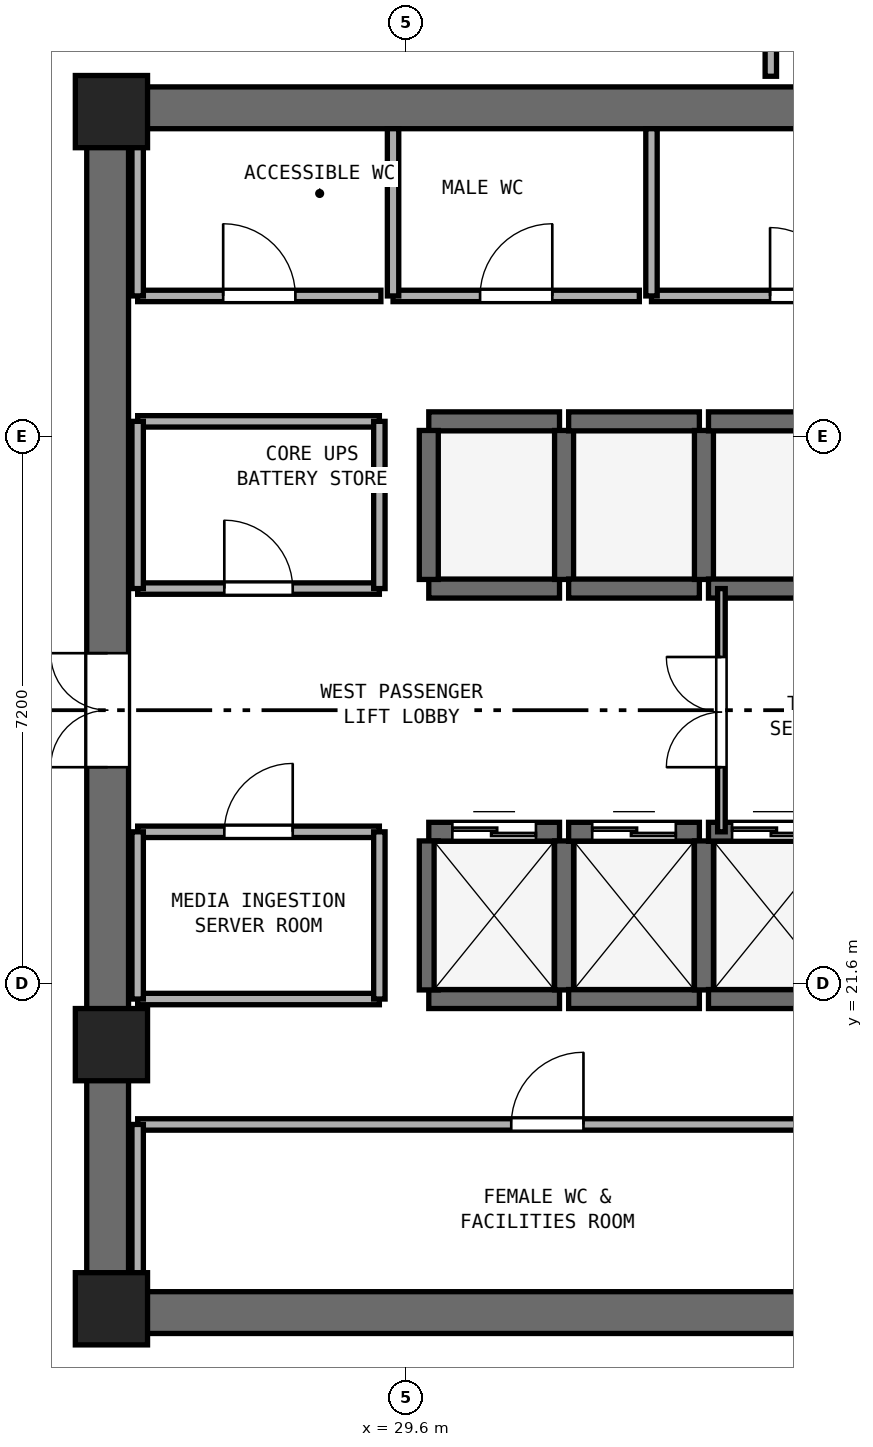
"""IFC4 building model, lengths in metres.
Left out: names, types, materials, properties, quantities, classifications, styles, units other than length and angle.
Written with IfcOpenShell. Run it as: python <this file> out.ifc"""

import sys

from ifc_helpers import new_model, si_unit, direction, frame, frame_2d, origin, origin_2d, place, context, subcontext, project, spatial, rectangle, extrude, element, fill, save


model = new_model("IFC4")
c1 = context("Model", 3, precision=1e-05, world=origin(), true_north=direction((0.0, 1.0)))
c2 = subcontext(c1, "Body", "Model", "MODEL_VIEW")
j1 = project(units=[si_unit("LENGTHUNIT", "METRE"), si_unit("PLANEANGLEUNIT", "RADIAN")], contexts=[c1])
p1 = place(None, origin())
s1 = spatial("IfcSite", under=j1, at=p1, CompositionType="ELEMENT")
p2 = place(p1, origin())
s2 = spatial("IfcBuilding", under=s1, at=p2, CompositionType="ELEMENT")
p3 = place(p2, frame((0.0, 0.0, 128.8)))
s3 = spatial("IfcBuildingStorey", under=s2, at=p3, CompositionType="ELEMENT", Elevation=128.8)
for number, where, z_axis, x_axis in (
    (1, (25.4, 17.275, 0.0), (0.0, 0.0, 1.0), (1.0, 0.0, 0.0)),
    (2, (25.4, 33.125, 0.0), (0.0, 0.0, 1.0), (1.0, 0.0, 0.0)),
):
    element("IfcWall", number, at=place(p3, frame(where, z_axis=z_axis, x_axis=x_axis)), inside=s3, PredefinedType="SHEAR", context=c2, shape_type="SweptSolid", body=[
        extrude(rectangle(XDim=23.2, YDim=0.55, at=frame_2d((11.6, 0.0))), origin(), (0.0, 0.0, 1.0), 3.54),
    ])
p4 = place(p3, frame((25.675, 17.55, 0.0), z_axis=(0.0, 0.0, 1.0), x_axis=(0.0, 1.0, 0.0)))
e3 = element("IfcWall", 3, at=p4, inside=s3, PredefinedType="SHEAR", context=c2, shape_type="SweptSolid", body=[
    extrude(rectangle(XDim=15.3, YDim=0.55, at=frame_2d((7.65, 0.0))), origin(), (0.0, 0.0, 1.0), 3.54),
])
p5 = place(p4, frame((6.9, 0.0, 0.0)))
e4 = element("IfcOpeningElement", 4, at=p5, cuts=e3, PredefinedType="OPENING", context=c2, shape_type="SweptSolid", body=[
    extrude(rectangle(XDim=1.5, YDim=2.15, at=frame_2d((0.75, 1.075))), frame((0.0, 0.285, 0.0), z_axis=(0.0, -1.0, 0.0), x_axis=(1.0, 0.0, 0.0)), (0.0, 0.0, 1.0), 0.57),
])
for number, where, z_axis, x_axis in (
    (5, (25.725, 17.325, 0.0), (0.0, 0.0, 1.0), (1.0, 0.0, 0.0)),
    (6, (25.725, 33.075, 0.0), (0.0, 0.0, 1.0), (1.0, 0.0, 0.0)),
    (7, (25.725, 20.8, 0.0), (0.0, 0.0, 1.0), (1.0, 0.0, 0.0)),
):
    element("IfcColumn", number, at=place(p3, frame(where, z_axis=z_axis, x_axis=x_axis)), inside=s3, PredefinedType="PILASTER", context=c2, shape_type="SweptSolid", body=[
        extrude(rectangle(XDim=0.95, YDim=0.95, at=origin_2d()), origin(), (0.0, 0.0, 1.0), 3.8),
    ])
p6 = place(p3, frame((29.9, 21.4, 0.0), z_axis=(0.0, 0.0, 1.0), x_axis=(1.0, 0.0, 0.0)))
e8 = element("IfcWall", 8, at=p6, inside=s3, PredefinedType="SHEAR", context=c2, shape_type="SweptSolid", body=[
    extrude(rectangle(XDim=1.72, YDim=0.25, at=frame_2d((0.86, 0.0))), origin(), (0.0, 0.0, 1.0), 3.54),
])
p7 = place(p3, frame((29.9, 23.6, 0.0), z_axis=(0.0, 0.0, 1.0), x_axis=(1.0, 0.0, 0.0)))
e9 = element("IfcWall", 9, at=p7, inside=s3, PredefinedType="SHEAR", context=c2, shape_type="SweptSolid", body=[
    extrude(rectangle(XDim=1.72, YDim=0.25, at=frame_2d((0.86, 0.0))), origin(), (0.0, 0.0, 1.0), 3.54),
])
p8 = place(p7, frame((0.31, 0.0, 0.0)))
e10 = element("IfcOpeningElement", 10, at=p8, cuts=e9, PredefinedType="OPENING", context=c2, shape_type="SweptSolid", body=[
    extrude(rectangle(XDim=1.1, YDim=2.15, at=frame_2d((0.55, 1.075))), frame((0.0, 0.135, 0.0), z_axis=(0.0, -1.0, 0.0), x_axis=(1.0, 0.0, 0.0)), (0.0, 0.0, 1.0), 0.27),
])
for number, where, z_axis, x_axis in (
    (11, (29.9, 21.52, 0.0), (0.0, 0.0, 1.0), (0.0, 1.0, 0.0)),
    (12, (31.68, 21.52, 0.0), (0.0, 0.0, 1.0), (0.0, 1.0, 0.0)),
):
    element("IfcWall", number, at=place(p3, frame(where, z_axis=z_axis, x_axis=x_axis)), inside=s3, PredefinedType="SHEAR", context=c2, shape_type="SweptSolid", body=[
        extrude(rectangle(XDim=1.96, YDim=0.25, at=frame_2d((0.98, 0.0))), origin(), (0.0, 0.0, 1.0), 3.54),
    ])
p9 = place(p3, frame((31.74, 21.4, 0.0), z_axis=(0.0, 0.0, 1.0), x_axis=(1.0, 0.0, 0.0)))
e13 = element("IfcWall", 13, at=p9, inside=s3, PredefinedType="SHEAR", context=c2, shape_type="SweptSolid", body=[
    extrude(rectangle(XDim=1.72, YDim=0.25, at=frame_2d((0.86, 0.0))), origin(), (0.0, 0.0, 1.0), 3.54),
])
p10 = place(p3, frame((31.74, 23.6, 0.0), z_axis=(0.0, 0.0, 1.0), x_axis=(1.0, 0.0, 0.0)))
e14 = element("IfcWall", 14, at=p10, inside=s3, PredefinedType="SHEAR", context=c2, shape_type="SweptSolid", body=[
    extrude(rectangle(XDim=1.72, YDim=0.25, at=frame_2d((0.86, 0.0))), origin(), (0.0, 0.0, 1.0), 3.54),
])
p11 = place(p10, frame((0.31, 0.0, 0.0)))
e15 = element("IfcOpeningElement", 15, at=p11, cuts=e14, PredefinedType="OPENING", context=c2, shape_type="SweptSolid", body=[
    extrude(rectangle(XDim=1.1, YDim=2.15, at=frame_2d((0.55, 1.075))), frame((0.0, 0.135, 0.0), z_axis=(0.0, -1.0, 0.0), x_axis=(1.0, 0.0, 0.0)), (0.0, 0.0, 1.0), 0.27),
])
p12 = place(p3, frame((33.52, 21.52, 0.0), z_axis=(0.0, 0.0, 1.0), x_axis=(0.0, 1.0, 0.0)))
e16 = element("IfcWall", 16, at=p12, inside=s3, PredefinedType="SHEAR", context=c2, shape_type="SweptSolid", body=[
    extrude(rectangle(XDim=1.96, YDim=0.25, at=frame_2d((0.98, 0.0))), origin(), (0.0, 0.0, 1.0), 3.54),
])
p13 = place(p3, frame((33.58, 21.4, 0.0), z_axis=(0.0, 0.0, 1.0), x_axis=(1.0, 0.0, 0.0)))
e17 = element("IfcWall", 17, at=p13, inside=s3, PredefinedType="SHEAR", context=c2, shape_type="SweptSolid", body=[
    extrude(rectangle(XDim=1.72, YDim=0.25, at=frame_2d((0.86, 0.0))), origin(), (0.0, 0.0, 1.0), 3.54),
])
p14 = place(p3, frame((33.58, 23.6, 0.0), z_axis=(0.0, 0.0, 1.0), x_axis=(1.0, 0.0, 0.0)))
e18 = element("IfcWall", 18, at=p14, inside=s3, PredefinedType="SHEAR", context=c2, shape_type="SweptSolid", body=[
    extrude(rectangle(XDim=1.72, YDim=0.25, at=frame_2d((0.86, 0.0))), origin(), (0.0, 0.0, 1.0), 3.54),
])
p15 = place(p14, frame((0.31, 0.0, 0.0)))
e19 = element("IfcOpeningElement", 19, at=p15, cuts=e18, PredefinedType="OPENING", context=c2, shape_type="SweptSolid", body=[
    extrude(rectangle(XDim=1.1, YDim=2.15, at=frame_2d((0.55, 1.075))), frame((0.0, 0.135, 0.0), z_axis=(0.0, -1.0, 0.0), x_axis=(1.0, 0.0, 0.0)), (0.0, 0.0, 1.0), 0.27),
])
for number, where, z_axis, x_axis in (
    (20, (29.9, 26.8, 0.0), (0.0, 0.0, 1.0), (1.0, 0.0, 0.0)),
    (21, (29.9, 29.0, 0.0), (0.0, 0.0, 1.0), (1.0, 0.0, 0.0)),
):
    element("IfcWall", number, at=place(p3, frame(where, z_axis=z_axis, x_axis=x_axis)), inside=s3, PredefinedType="SHEAR", context=c2, shape_type="SweptSolid", body=[
        extrude(rectangle(XDim=1.72, YDim=0.25, at=frame_2d((0.86, 0.0))), origin(), (0.0, 0.0, 1.0), 3.54),
    ])
for number, where, z_axis, x_axis in (
    (22, (29.9, 26.92, 0.0), (0.0, 0.0, 1.0), (0.0, 1.0, 0.0)),
    (23, (31.68, 26.92, 0.0), (0.0, 0.0, 1.0), (0.0, 1.0, 0.0)),
):
    element("IfcWall", number, at=place(p3, frame(where, z_axis=z_axis, x_axis=x_axis)), inside=s3, PredefinedType="SHEAR", context=c2, shape_type="SweptSolid", body=[
        extrude(rectangle(XDim=1.96, YDim=0.25, at=frame_2d((0.98, 0.0))), origin(), (0.0, 0.0, 1.0), 3.54),
    ])
for number, where, z_axis, x_axis in (
    (24, (31.74, 26.8, 0.0), (0.0, 0.0, 1.0), (1.0, 0.0, 0.0)),
    (25, (31.74, 29.0, 0.0), (0.0, 0.0, 1.0), (1.0, 0.0, 0.0)),
):
    element("IfcWall", number, at=place(p3, frame(where, z_axis=z_axis, x_axis=x_axis)), inside=s3, PredefinedType="SHEAR", context=c2, shape_type="SweptSolid", body=[
        extrude(rectangle(XDim=1.72, YDim=0.25, at=frame_2d((0.86, 0.0))), origin(), (0.0, 0.0, 1.0), 3.54),
    ])
p16 = place(p3, frame((33.52, 26.92, 0.0), z_axis=(0.0, 0.0, 1.0), x_axis=(0.0, 1.0, 0.0)))
e26 = element("IfcWall", 26, at=p16, inside=s3, PredefinedType="SHEAR", context=c2, shape_type="SweptSolid", body=[
    extrude(rectangle(XDim=1.96, YDim=0.25, at=frame_2d((0.98, 0.0))), origin(), (0.0, 0.0, 1.0), 3.54),
])
for number, where, z_axis, x_axis in (
    (27, (33.58, 26.8, 0.0), (0.0, 0.0, 1.0), (1.0, 0.0, 0.0)),
    (28, (33.58, 29.0, 0.0), (0.0, 0.0, 1.0), (1.0, 0.0, 0.0)),
):
    element("IfcWall", number, at=place(p3, frame(where, z_axis=z_axis, x_axis=x_axis)), inside=s3, PredefinedType="SHEAR", context=c2, shape_type="SweptSolid", body=[
        extrude(rectangle(XDim=1.72, YDim=0.25, at=frame_2d((0.86, 0.0))), origin(), (0.0, 0.0, 1.0), 3.54),
    ])
p17 = place(p3, frame((26.07, 30.65, 0.0), z_axis=(0.0, 0.0, 1.0), x_axis=(1.0, 0.0, 0.0)))
e29 = element("IfcWall", 29, at=p17, inside=s3, PredefinedType="PARTITIONING", context=c2, shape_type="SweptSolid", body=[
    extrude(rectangle(XDim=3.2, YDim=0.15, at=frame_2d((1.6, 0.0))), origin(), (0.0, 0.0, 1.0), 3.54),
])
p18 = place(p17, frame((1.125, 0.0, 0.0)))
e30 = element("IfcOpeningElement", 30, at=p18, cuts=e29, PredefinedType="OPENING", context=c2, shape_type="SweptSolid", body=[
    extrude(rectangle(XDim=0.95, YDim=2.1, at=frame_2d((0.475, 1.05))), frame((0.0, 0.085, 0.0), z_axis=(0.0, -1.0, 0.0), x_axis=(1.0, 0.0, 0.0)), (0.0, 0.0, 1.0), 0.17),
])
p19 = place(p3, frame((26.07, 30.65, 0.0), z_axis=(0.0, 0.0, 1.0), x_axis=(0.0, 1.0, 0.0)))
e31 = element("IfcWall", 31, at=p19, inside=s3, PredefinedType="PARTITIONING", context=c2, shape_type="SweptSolid", body=[
    extrude(rectangle(XDim=2.2, YDim=0.15, at=frame_2d((1.1, 0.0))), origin(), (0.0, 0.0, 1.0), 2.64),
])
p20 = place(p3, frame((29.43, 30.65, 0.0), z_axis=(0.0, 0.0, 1.0), x_axis=(1.0, 0.0, 0.0)))
e32 = element("IfcWall", 32, at=p20, inside=s3, PredefinedType="PARTITIONING", context=c2, shape_type="SweptSolid", body=[
    extrude(rectangle(XDim=3.24, YDim=0.15, at=frame_2d((1.62, 0.0))), origin(), (0.0, 0.0, 1.0), 3.54),
])
p21 = place(p20, frame((1.145, 0.0, 0.0)))
e33 = element("IfcOpeningElement", 33, at=p21, cuts=e32, PredefinedType="OPENING", context=c2, shape_type="SweptSolid", body=[
    extrude(rectangle(XDim=0.95, YDim=2.1, at=frame_2d((0.475, 1.05))), frame((0.0, 0.085, 0.0), z_axis=(0.0, -1.0, 0.0), x_axis=(1.0, 0.0, 0.0)), (0.0, 0.0, 1.0), 0.17),
])
p22 = place(p3, frame((29.43, 30.65, 0.0), z_axis=(0.0, 0.0, 1.0), x_axis=(0.0, 1.0, 0.0)))
e34 = element("IfcWall", 34, at=p22, inside=s3, PredefinedType="PARTITIONING", context=c2, shape_type="SweptSolid", body=[
    extrude(rectangle(XDim=2.2, YDim=0.15, at=frame_2d((1.1, 0.0))), origin(), (0.0, 0.0, 1.0), 3.54),
])
p23 = place(p3, frame((32.83, 30.65, 0.0), z_axis=(0.0, 0.0, 1.0), x_axis=(1.0, 0.0, 0.0)))
e35 = element("IfcWall", 35, at=p23, inside=s3, PredefinedType="PARTITIONING", context=c2, shape_type="SweptSolid", body=[
    extrude(rectangle(XDim=4.02, YDim=0.15, at=frame_2d((2.01, 0.0))), origin(), (0.0, 0.0, 1.0), 3.54),
])
p24 = place(p23, frame((1.56, 0.0, 0.0)))
e36 = element("IfcOpeningElement", 36, at=p24, cuts=e35, PredefinedType="OPENING", context=c2, shape_type="SweptSolid", body=[
    extrude(rectangle(XDim=0.9, YDim=2.1, at=frame_2d((0.45, 1.05))), frame((0.0, 0.085, 0.0), z_axis=(0.0, -1.0, 0.0), x_axis=(1.0, 0.0, 0.0)), (0.0, 0.0, 1.0), 0.17),
])
p25 = place(p3, frame((32.83, 30.65, 0.0), z_axis=(0.0, 0.0, 1.0), x_axis=(0.0, 1.0, 0.0)))
e37 = element("IfcWall", 37, at=p25, inside=s3, PredefinedType="PARTITIONING", context=c2, shape_type="SweptSolid", body=[
    extrude(rectangle(XDim=2.2, YDim=0.15, at=frame_2d((1.1, 0.0))), origin(), (0.0, 0.0, 1.0), 3.54),
])
p26 = place(p3, frame((26.07, 19.75, 0.0), z_axis=(0.0, 0.0, 1.0), x_axis=(1.0, 0.0, 0.0)))
e38 = element("IfcWall", 38, at=p26, inside=s3, PredefinedType="PARTITIONING", context=c2, shape_type="SweptSolid", body=[
    extrude(rectangle(XDim=10.78, YDim=0.15, at=frame_2d((5.39, 0.0))), origin(), (0.0, 0.0, 1.0), 3.54),
])
p27 = place(p26, frame((4.915, 0.0, 0.0)))
e39 = element("IfcOpeningElement", 39, at=p27, cuts=e38, PredefinedType="OPENING", context=c2, shape_type="SweptSolid", body=[
    extrude(rectangle(XDim=0.95, YDim=2.1, at=frame_2d((0.475, 1.05))), frame((0.0, 0.085, 0.0), z_axis=(0.0, -1.0, 0.0), x_axis=(1.0, 0.0, 0.0)), (0.0, 0.0, 1.0), 0.17),
])
p28 = place(p3, frame((26.07, 17.55, 0.0), z_axis=(0.0, 0.0, 1.0), x_axis=(0.0, 1.0, 0.0)))
e40 = element("IfcWall", 40, at=p28, inside=s3, PredefinedType="PARTITIONING", context=c2, shape_type="SweptSolid", body=[
    extrude(rectangle(XDim=2.2, YDim=0.15, at=frame_2d((1.1, 0.0))), origin(), (0.0, 0.0, 1.0), 2.64),
])
p29 = place(p3, frame((26.07, 26.8, 0.0), z_axis=(0.0, 0.0, 1.0), x_axis=(1.0, 0.0, 0.0)))
e41 = element("IfcWall", 41, at=p29, inside=s3, PredefinedType="PARTITIONING", context=c2, shape_type="SweptSolid", body=[
    extrude(rectangle(XDim=3.18, YDim=0.15, at=frame_2d((1.59, 0.0))), origin(), (0.0, 0.0, 1.0), 3.54),
])
p30 = place(p29, frame((1.14, 0.0, 0.0)))
e42 = element("IfcOpeningElement", 42, at=p30, cuts=e41, PredefinedType="OPENING", context=c2, shape_type="SweptSolid", body=[
    extrude(rectangle(XDim=0.9, YDim=2.1, at=frame_2d((0.45, 1.05))), frame((0.0, 0.085, 0.0), z_axis=(0.0, -1.0, 0.0), x_axis=(1.0, 0.0, 0.0)), (0.0, 0.0, 1.0), 0.17),
])
p31 = place(p3, frame((26.07, 29.0, 0.0), z_axis=(0.0, 0.0, 1.0), x_axis=(1.0, 0.0, 0.0)))
e43 = element("IfcWall", 43, at=p31, inside=s3, PredefinedType="PARTITIONING", context=c2, shape_type="SweptSolid", body=[
    extrude(rectangle(XDim=3.18, YDim=0.15, at=frame_2d((1.59, 0.0))), origin(), (0.0, 0.0, 1.0), 3.54),
])
p32 = place(p3, frame((26.07, 26.8, 0.0), z_axis=(0.0, 0.0, 1.0), x_axis=(0.0, 1.0, 0.0)))
e44 = element("IfcWall", 44, at=p32, inside=s3, PredefinedType="PARTITIONING", context=c2, shape_type="SweptSolid", body=[
    extrude(rectangle(XDim=2.2, YDim=0.15, at=frame_2d((1.1, 0.0))), origin(), (0.0, 0.0, 1.0), 2.64),
])
p33 = place(p3, frame((29.25, 26.8, 0.0), z_axis=(0.0, 0.0, 1.0), x_axis=(0.0, 1.0, 0.0)))
e45 = element("IfcWall", 45, at=p33, inside=s3, PredefinedType="PARTITIONING", context=c2, shape_type="SweptSolid", body=[
    extrude(rectangle(XDim=2.2, YDim=0.15, at=frame_2d((1.1, 0.0))), origin(), (0.0, 0.0, 1.0), 3.54),
])
p34 = place(p3, frame((26.07, 21.4, 0.0), z_axis=(0.0, 0.0, 1.0), x_axis=(1.0, 0.0, 0.0)))
e46 = element("IfcWall", 46, at=p34, inside=s3, PredefinedType="PARTITIONING", context=c2, shape_type="SweptSolid", body=[
    extrude(rectangle(XDim=3.18, YDim=0.15, at=frame_2d((1.59, 0.0))), origin(), (0.0, 0.0, 1.0), 3.54),
])
p35 = place(p3, frame((26.07, 23.6, 0.0), z_axis=(0.0, 0.0, 1.0), x_axis=(1.0, 0.0, 0.0)))
e47 = element("IfcWall", 47, at=p35, inside=s3, PredefinedType="PARTITIONING", context=c2, shape_type="SweptSolid", body=[
    extrude(rectangle(XDim=3.18, YDim=0.15, at=frame_2d((1.59, 0.0))), origin(), (0.0, 0.0, 1.0), 3.54),
])
p36 = place(p35, frame((1.14, 0.0, 0.0)))
e48 = element("IfcOpeningElement", 48, at=p36, cuts=e47, PredefinedType="OPENING", context=c2, shape_type="SweptSolid", body=[
    extrude(rectangle(XDim=0.9, YDim=2.1, at=frame_2d((0.45, 1.05))), frame((0.0, 0.085, 0.0), z_axis=(0.0, -1.0, 0.0), x_axis=(1.0, 0.0, 0.0)), (0.0, 0.0, 1.0), 0.17),
])
p37 = place(p3, frame((26.07, 21.4, 0.0), z_axis=(0.0, 0.0, 1.0), x_axis=(0.0, 1.0, 0.0)))
e49 = element("IfcWall", 49, at=p37, inside=s3, PredefinedType="PARTITIONING", context=c2, shape_type="SweptSolid", body=[
    extrude(rectangle(XDim=2.2, YDim=0.15, at=frame_2d((1.1, 0.0))), origin(), (0.0, 0.0, 1.0), 2.64),
])
p38 = place(p3, frame((29.25, 21.4, 0.0), z_axis=(0.0, 0.0, 1.0), x_axis=(0.0, 1.0, 0.0)))
e50 = element("IfcWall", 50, at=p38, inside=s3, PredefinedType="PARTITIONING", context=c2, shape_type="SweptSolid", body=[
    extrude(rectangle(XDim=2.2, YDim=0.15, at=frame_2d((1.1, 0.0))), origin(), (0.0, 0.0, 1.0), 3.54),
])
p39 = place(p3, frame((33.75, 23.6, 0.0), z_axis=(0.0, 0.0, 1.0), x_axis=(0.0, 1.0, 0.0)))
e51 = element("IfcWall", 51, at=p39, inside=s3, PredefinedType="PARTITIONING", context=c2, shape_type="SweptSolid", body=[
    extrude(rectangle(XDim=3.2, YDim=0.1, at=frame_2d((1.6, 0.0))), origin(), (0.0, 0.0, 1.0), 3.54),
])
p40 = place(p39, frame((0.85, 0.0, 0.0)))
e52 = element("IfcOpeningElement", 52, at=p40, cuts=e51, PredefinedType="OPENING", context=c2, shape_type="SweptSolid", body=[
    extrude(rectangle(XDim=1.45, YDim=2.12, at=frame_2d((0.725, 1.06))), frame((0.0, 0.06, 0.0), z_axis=(0.0, -1.0, 0.0), x_axis=(1.0, 0.0, 0.0)), (0.0, 0.0, 1.0), 0.12),
])
p41 = place(p3, frame((34.4, 33.54, 0.0), z_axis=(0.0, 0.0, 1.0), x_axis=(0.0, 1.0, 0.0)))
e53 = element("IfcWall", 53, at=p41, inside=s3, PredefinedType="PARTITIONING", context=c2, shape_type="SweptSolid", body=[
    extrude(rectangle(XDim=2.41, YDim=0.15, at=frame_2d((1.205, 0.0))), origin(), (0.0, 0.0, 1.0), 3.54),
])
p42 = place(p8, origin())
e54 = element("IfcDoor", 54, at=p42, inside=s3, OperationType="DOUBLE_DOOR_SLIDING", PredefinedType="DOOR", context=c2, shape_type="SweptSolid", body=[
    extrude(rectangle(XDim=1.1, YDim=2.15, at=frame_2d((0.55, 1.075))), frame((0.0, 0.025, 0.0), z_axis=(0.0, -1.0, 0.0), x_axis=(1.0, 0.0, 0.0)), (0.0, 0.0, 1.0), 0.05),
])
fill(e10, e54)
p43 = place(p11, origin())
e55 = element("IfcDoor", 55, at=p43, inside=s3, OperationType="DOUBLE_DOOR_SLIDING", PredefinedType="DOOR", context=c2, shape_type="SweptSolid", body=[
    extrude(rectangle(XDim=1.1, YDim=2.15, at=frame_2d((0.55, 1.075))), frame((0.0, 0.025, 0.0), z_axis=(0.0, -1.0, 0.0), x_axis=(1.0, 0.0, 0.0)), (0.0, 0.0, 1.0), 0.05),
])
fill(e15, e55)
p44 = place(p15, origin())
e56 = element("IfcDoor", 56, at=p44, inside=s3, OperationType="DOUBLE_DOOR_SLIDING", PredefinedType="DOOR", context=c2, shape_type="SweptSolid", body=[
    extrude(rectangle(XDim=1.1, YDim=2.15, at=frame_2d((0.55, 1.075))), frame((0.0, 0.025, 0.0), z_axis=(0.0, -1.0, 0.0), x_axis=(1.0, 0.0, 0.0)), (0.0, 0.0, 1.0), 0.05),
])
fill(e19, e56)
p45 = place(p5, origin())
e57 = element("IfcDoor", 57, at=p45, inside=s3, OperationType="DOUBLE_DOOR_SINGLE_SWING", PredefinedType="DOOR", context=c2, shape_type="SweptSolid", body=[
    extrude(rectangle(XDim=1.5, YDim=2.15, at=frame_2d((0.75, 1.075))), frame((0.0, 0.025, 0.0), z_axis=(0.0, -1.0, 0.0), x_axis=(1.0, 0.0, 0.0)), (0.0, 0.0, 1.0), 0.05),
])
fill(e4, e57)
p46 = place(p18, origin())
e58 = element("IfcDoor", 58, at=p46, inside=s3, OperationType="SINGLE_SWING_LEFT", PredefinedType="DOOR", context=c2, shape_type="SweptSolid", body=[
    extrude(rectangle(XDim=0.95, YDim=2.1, at=frame_2d((0.475, 1.05))), frame((0.0, 0.025, 0.0), z_axis=(0.0, -1.0, 0.0), x_axis=(1.0, 0.0, 0.0)), (0.0, 0.0, 1.0), 0.05),
])
fill(e30, e58)
p47 = place(p21, origin())
e59 = element("IfcDoor", 59, at=p47, inside=s3, OperationType="SINGLE_SWING_RIGHT", PredefinedType="DOOR", context=c2, shape_type="SweptSolid", body=[
    extrude(rectangle(XDim=0.95, YDim=2.1, at=frame_2d((0.475, 1.05))), frame((0.0, 0.025, 0.0), z_axis=(0.0, -1.0, 0.0), x_axis=(1.0, 0.0, 0.0)), (0.0, 0.0, 1.0), 0.05),
])
fill(e33, e59)
p48 = place(p24, origin())
e60 = element("IfcDoor", 60, at=p48, inside=s3, OperationType="SINGLE_SWING_LEFT", PredefinedType="DOOR", context=c2, shape_type="SweptSolid", body=[
    extrude(rectangle(XDim=0.9, YDim=2.1, at=frame_2d((0.45, 1.05))), frame((0.0, 0.025, 0.0), z_axis=(0.0, -1.0, 0.0), x_axis=(1.0, 0.0, 0.0)), (0.0, 0.0, 1.0), 0.05),
])
fill(e36, e60)
p49 = place(p27, origin())
e61 = element("IfcDoor", 61, at=p49, inside=s3, OperationType="SINGLE_SWING_RIGHT", PredefinedType="DOOR", context=c2, shape_type="SweptSolid", body=[
    extrude(rectangle(XDim=0.95, YDim=2.1, at=frame_2d((0.475, 1.05))), frame((0.0, 0.025, 0.0), z_axis=(0.0, -1.0, 0.0), x_axis=(1.0, 0.0, 0.0)), (0.0, 0.0, 1.0), 0.05),
])
fill(e39, e61)
p50 = place(p30, origin())
e62 = element("IfcDoor", 62, at=p50, inside=s3, OperationType="SINGLE_SWING_LEFT", PredefinedType="DOOR", context=c2, shape_type="SweptSolid", body=[
    extrude(rectangle(XDim=0.9, YDim=2.1, at=frame_2d((0.45, 1.05))), frame((0.0, 0.025, 0.0), z_axis=(0.0, -1.0, 0.0), x_axis=(1.0, 0.0, 0.0)), (0.0, 0.0, 1.0), 0.05),
])
fill(e42, e62)
p51 = place(p36, origin())
e63 = element("IfcDoor", 63, at=p51, inside=s3, OperationType="SINGLE_SWING_RIGHT", PredefinedType="DOOR", context=c2, shape_type="SweptSolid", body=[
    extrude(rectangle(XDim=0.9, YDim=2.1, at=frame_2d((0.45, 1.05))), frame((0.0, 0.025, 0.0), z_axis=(0.0, -1.0, 0.0), x_axis=(1.0, 0.0, 0.0)), (0.0, 0.0, 1.0), 0.05),
])
fill(e48, e63)
p52 = place(p40, origin())
e64 = element("IfcDoor", 64, at=p52, inside=s3, OperationType="DOUBLE_DOOR_SINGLE_SWING", PredefinedType="DOOR", context=c2, shape_type="SweptSolid", body=[
    extrude(rectangle(XDim=1.45, YDim=2.12, at=frame_2d((0.725, 1.06))), frame((0.0, 0.025, 0.0), z_axis=(0.0, -1.0, 0.0), x_axis=(1.0, 0.0, 0.0)), (0.0, 0.0, 1.0), 0.05),
])
fill(e52, e64)
save(model, sys.argv[1])
